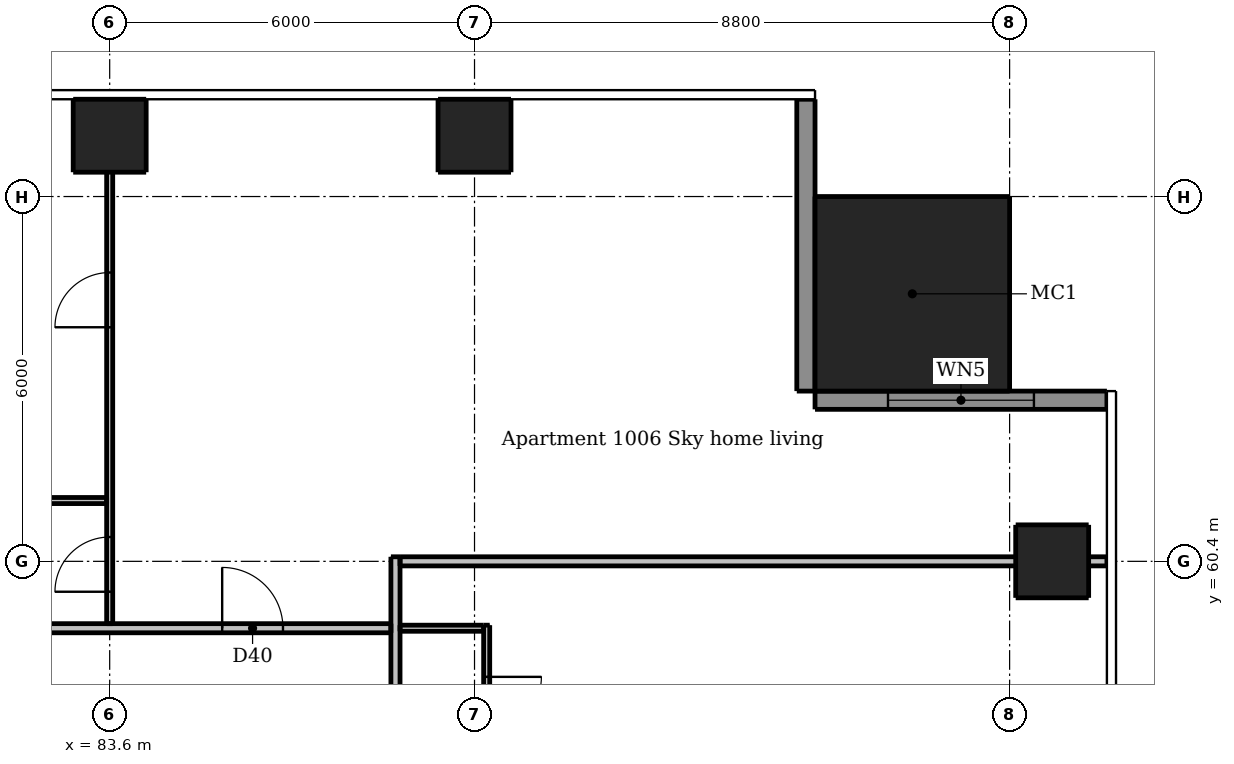
"""IFC4 building model, lengths in metres.
Left out: names, types, materials, properties, quantities, classifications, styles, units other than length and angle.
Written with IfcOpenShell. Run it as: python <this file> out.ifc"""

import sys

from ifc_helpers import new_model, si_unit, direction, frame, frame_2d, origin, origin_2d, place, context, subcontext, project, spatial, rectangle, extrude, element, fill, save


model = new_model("IFC4")
c1 = context("Model", 3, precision=1e-05, world=origin(), true_north=direction((0.0, 1.0)))
c2 = subcontext(c1, "Body", "Model", "MODEL_VIEW")
j1 = project(units=[si_unit("LENGTHUNIT", "METRE"), si_unit("PLANEANGLEUNIT", "RADIAN")], contexts=[c1])
p1 = place(None, origin())
s1 = spatial("IfcSite", under=j1, at=p1, CompositionType="ELEMENT")
p2 = place(p1, origin())
s2 = spatial("IfcBuilding", under=s1, at=p2, CompositionType="ELEMENT")
p3 = place(p2, frame((0.0, 0.0, 40.0)))
s3 = spatial("IfcBuildingStorey", under=s2, at=p3, CompositionType="ELEMENT", Elevation=40.0)
for number, where, z_axis, x_axis in (
    (1, (99.1, 60.4, 0.0), (0.0, 0.0, 1.0), (1.0, 0.0, 0.0)),
    (2, (83.6, 67.4, 0.0), (0.0, 0.0, 1.0), (1.0, 0.0, 0.0)),
    (3, (89.6, 67.4, 0.0), (0.0, 0.0, 1.0), (1.0, 0.0, 0.0)),
):
    element("IfcColumn", number, at=place(p3, frame(where, z_axis=z_axis, x_axis=x_axis)), inside=s3, PredefinedType="COLUMN", context=c2, shape_type="SweptSolid", body=[
        extrude(rectangle(XDim=1.2, YDim=1.2, at=origin_2d()), origin(), (0.0, 0.0, 1.0), 3.05),
    ])
p4 = place(p3, frame((96.8, 64.8, 0.0), z_axis=(0.0, 0.0, 1.0), x_axis=(1.0, 0.0, 0.0)))
e4 = element("IfcColumn", 4, at=p4, inside=s3, PredefinedType="COLUMN", context=c2, shape_type="SweptSolid", body=[
    extrude(rectangle(XDim=3.2, YDim=3.2, at=origin_2d()), origin(), (0.0, 0.0, 1.0), 3.3),
])
p5 = place(p3, frame((100.0, 63.05, 0.0), z_axis=(0.0, 0.0, 1.0), x_axis=(-1.0, 0.0, 0.0)))
e5 = element("IfcWall", 5, at=p5, inside=s3, PredefinedType="SOLIDWALL", context=c2, shape_type="SweptSolid", body=[
    extrude(rectangle(XDim=4.8, YDim=0.3, at=frame_2d((2.4, 0.0))), origin(), (0.0, 0.0, 1.0), 3.05),
])
p6 = place(p5, frame((1.2, 0.0, 0.15)))
e6 = element("IfcOpeningElement", 6, at=p6, cuts=e5, PredefinedType="OPENING", context=c2, shape_type="SweptSolid", body=[
    extrude(rectangle(XDim=2.4, YDim=2.1, at=frame_2d((1.2, 1.05))), frame((0.0, 0.16, 0.0), z_axis=(0.0, -1.0, 0.0), x_axis=(1.0, 0.0, 0.0)), (0.0, 0.0, 1.0), 0.32),
])
p7 = place(p3, frame((95.05, 63.2, 0.0), z_axis=(0.0, 0.0, 1.0), x_axis=(0.0, 1.0, 0.0)))
e7 = element("IfcWall", 7, at=p7, inside=s3, PredefinedType="SOLIDWALL", context=c2, shape_type="SweptSolid", body=[
    extrude(rectangle(XDim=4.8, YDim=0.3, at=frame_2d((2.4, 0.0))), origin(), (0.0, 0.0, 1.0), 3.05),
])
p8 = place(p3, frame((83.6, 59.375, 0.0), z_axis=(0.0, 0.0, 1.0), x_axis=(0.0, 1.0, 0.0)))
e8 = element("IfcWall", 8, at=p8, inside=s3, PredefinedType="PARTITIONING", context=c2, shape_type="SweptSolid", body=[
    extrude(rectangle(XDim=8.625, YDim=0.1, at=frame_2d((4.312, 0.0))), origin(), (0.0, 0.0, 1.0), 2.516),
])
p9 = place(p8, frame((0.525, 0.0, 0.0)))
e9 = element("IfcOpeningElement", 9, at=p9, cuts=e8, PredefinedType="OPENING", context=c2, shape_type="SweptSolid", body=[
    extrude(rectangle(XDim=0.9, YDim=2.1, at=frame_2d((0.45, 1.05))), frame((0.0, 0.06, 0.0), z_axis=(0.0, -1.0, 0.0), x_axis=(1.0, 0.0, 0.0)), (0.0, 0.0, 1.0), 0.12),
])
p10 = place(p8, frame((4.875, 0.0, 0.0)))
e10 = element("IfcOpeningElement", 10, at=p10, cuts=e8, PredefinedType="OPENING", context=c2, shape_type="SweptSolid", body=[
    extrude(rectangle(XDim=0.9, YDim=2.1, at=frame_2d((0.45, 1.05))), frame((0.0, 0.06, 0.0), z_axis=(0.0, -1.0, 0.0), x_axis=(1.0, 0.0, 0.0)), (0.0, 0.0, 1.0), 0.12),
])
p11 = place(p3, frame((89.8, 59.35, 0.0), z_axis=(0.0, 0.0, 1.0), x_axis=(0.0, -1.0, 0.0)))
e11 = element("IfcWall", 11, at=p11, inside=s3, PredefinedType="PARTITIONING", context=c2, shape_type="SweptSolid", body=[
    extrude(rectangle(XDim=19.875, YDim=0.1, at=frame_2d((9.938, 0.0))), origin(), (0.0, 0.0, 1.0), 3.05),
])
p12 = place(p11, frame((15.0, 0.0, 0.0)))
e12 = element("IfcOpeningElement", 12, at=p12, cuts=e11, PredefinedType="OPENING", context=c2, shape_type="SweptSolid", body=[
    extrude(rectangle(XDim=0.9, YDim=2.1, at=frame_2d((0.45, 1.05))), frame((0.0, 0.06, 0.0), z_axis=(0.0, -1.0, 0.0), x_axis=(1.0, 0.0, 0.0)), (0.0, 0.0, 1.0), 0.12),
])
p13 = place(p11, frame((9.0, 0.0, 0.0)))
e13 = element("IfcOpeningElement", 13, at=p13, cuts=e11, PredefinedType="OPENING", context=c2, shape_type="SweptSolid", body=[
    extrude(rectangle(XDim=0.9, YDim=2.1, at=frame_2d((0.45, 1.05))), frame((0.0, 0.06, 0.0), z_axis=(0.0, -1.0, 0.0), x_axis=(1.0, 0.0, 0.0)), (0.0, 0.0, 1.0), 0.12),
])
p14 = place(p11, frame((6.0, 0.0, 0.0)))
e14 = element("IfcOpeningElement", 14, at=p14, cuts=e11, PredefinedType="OPENING", context=c2, shape_type="SweptSolid", body=[
    extrude(rectangle(XDim=0.9, YDim=2.1, at=frame_2d((0.45, 1.05))), frame((0.0, 0.06, 0.0), z_axis=(0.0, -1.0, 0.0), x_axis=(1.0, 0.0, 0.0)), (0.0, 0.0, 1.0), 0.12),
])
p15 = place(p11, frame((0.85, 0.0, 0.0)))
e15 = element("IfcOpeningElement", 15, at=p15, cuts=e11, PredefinedType="OPENING", context=c2, shape_type="SweptSolid", body=[
    extrude(rectangle(XDim=0.9, YDim=2.1, at=frame_2d((0.45, 1.05))), frame((0.0, 0.06, 0.0), z_axis=(0.0, -1.0, 0.0), x_axis=(1.0, 0.0, 0.0)), (0.0, 0.0, 1.0), 0.12),
])
p16 = place(p11, frame((3.35, 0.0, 0.0)))
e16 = element("IfcOpeningElement", 16, at=p16, cuts=e11, PredefinedType="OPENING", context=c2, shape_type="SweptSolid", body=[
    extrude(rectangle(XDim=0.8, YDim=2.1, at=frame_2d((0.4, 1.05))), frame((0.0, 0.06, 0.0), z_axis=(0.0, -1.0, 0.0), x_axis=(1.0, 0.0, 0.0)), (0.0, 0.0, 1.0), 0.12),
])
p17 = place(p3, frame((83.55, 61.4, 0.0), z_axis=(0.0, 0.0, 1.0), x_axis=(-1.0, 0.0, 0.0)))
e17 = element("IfcWall", 17, at=p17, inside=s3, PredefinedType="PARTITIONING", context=c2, shape_type="SweptSolid", body=[
    extrude(rectangle(XDim=5.875, YDim=0.1, at=frame_2d((2.938, 0.0))), origin(), (0.0, 0.0, 1.0), 3.05),
])
p18 = place(p17, frame((3.75, 0.0, 0.0)))
e18 = element("IfcOpeningElement", 18, at=p18, cuts=e17, PredefinedType="OPENING", context=c2, shape_type="SweptSolid", body=[
    extrude(rectangle(XDim=0.8, YDim=2.1, at=frame_2d((0.4, 1.05))), frame((0.0, 0.06, 0.0), z_axis=(0.0, -1.0, 0.0), x_axis=(1.0, 0.0, 0.0)), (0.0, 0.0, 1.0), 0.12),
])
p19 = place(p3, frame((88.375, 59.3, 0.0), z_axis=(0.0, 0.0, 1.0), x_axis=(1.0, 0.0, 0.0)))
e19 = element("IfcWall", 19, at=p19, inside=s3, PredefinedType="PARTITIONING", context=c2, shape_type="SweptSolid", body=[
    extrude(rectangle(XDim=1.375, YDim=0.1, at=frame_2d((0.688, 0.0))), origin(), (0.0, 0.0, 1.0), 3.05),
])
p20 = place(p3, frame((88.3, 60.475, 0.0), z_axis=(0.0, 0.0, 1.0), x_axis=(0.0, -1.0, 0.0)))
e20 = element("IfcWall", 20, at=p20, inside=s3, PredefinedType="PARTITIONING", context=c2, shape_type="SweptSolid", body=[
    extrude(rectangle(XDim=28.7, YDim=0.15, at=frame_2d((14.35, 0.0))), origin(), (0.0, 0.0, 1.0), 3.05),
])
p21 = place(p20, frame((27.425, 0.0, 0.0)))
e21 = element("IfcOpeningElement", 21, at=p21, cuts=e20, PredefinedType="OPENING", context=c2, shape_type="SweptSolid", body=[
    extrude(rectangle(XDim=1.0, YDim=2.1, at=frame_2d((0.5, 1.05))), frame((0.0, 0.085, 0.0), z_axis=(0.0, -1.0, 0.0), x_axis=(1.0, 0.0, 0.0)), (0.0, 0.0, 1.0), 0.17),
])
p22 = place(p20, frame((10.625, 0.0, 0.0)))
e22 = element("IfcOpeningElement", 22, at=p22, cuts=e20, PredefinedType="OPENING", context=c2, shape_type="SweptSolid", body=[
    extrude(rectangle(XDim=1.0, YDim=2.1, at=frame_2d((0.5, 1.05))), frame((0.0, 0.085, 0.0), z_axis=(0.0, -1.0, 0.0), x_axis=(1.0, 0.0, 0.0)), (0.0, 0.0, 1.0), 0.17),
])
p23 = place(p3, frame((88.375, 60.4, 0.0), z_axis=(0.0, 0.0, 1.0), x_axis=(1.0, 0.0, 0.0)))
e23 = element("IfcWall", 23, at=p23, inside=s3, PredefinedType="PARTITIONING", context=c2, shape_type="SweptSolid", body=[
    extrude(rectangle(XDim=11.625, YDim=0.15, at=frame_2d((5.812, 0.0))), origin(), (0.0, 0.0, 1.0), 2.516),
])
p24 = place(p3, frame((59.675, 59.3, 0.0), z_axis=(0.0, 0.0, 1.0), x_axis=(1.0, 0.0, 0.0)))
e24 = element("IfcWall", 24, at=p24, inside=s3, PredefinedType="PARTITIONING", context=c2, shape_type="SweptSolid", body=[
    extrude(rectangle(XDim=28.55, YDim=0.15, at=frame_2d((14.275, 0.0))), origin(), (0.0, 0.0, 1.0), 3.05),
])
p25 = place(p24, frame((8.975, 0.0, 0.0)))
e25 = element("IfcOpeningElement", 25, at=p25, cuts=e24, PredefinedType="OPENING", context=c2, shape_type="SweptSolid", body=[
    extrude(rectangle(XDim=1.0, YDim=2.1, at=frame_2d((0.5, 1.05))), frame((0.0, 0.085, 0.0), z_axis=(0.0, -1.0, 0.0), x_axis=(1.0, 0.0, 0.0)), (0.0, 0.0, 1.0), 0.17),
])
p26 = place(p24, frame((25.775, 0.0, 0.0)))
e26 = element("IfcOpeningElement", 26, at=p26, cuts=e24, PredefinedType="OPENING", context=c2, shape_type="SweptSolid", body=[
    extrude(rectangle(XDim=1.0, YDim=2.1, at=frame_2d((0.5, 1.05))), frame((0.0, 0.085, 0.0), z_axis=(0.0, -1.0, 0.0), x_axis=(1.0, 0.0, 0.0)), (0.0, 0.0, 1.0), 0.17),
])
p27 = place(p6, origin())
e27 = element("IfcWindow", 27, at=p27, inside=s3, PartitioningType="DOUBLE_PANEL_VERTICAL", PredefinedType="WINDOW", context=c2, shape_type="SweptSolid", body=[
    extrude(rectangle(XDim=2.4, YDim=2.1, at=frame_2d((1.2, 1.05))), frame((0.0, 0.03, 0.0), z_axis=(0.0, -1.0, 0.0), x_axis=(1.0, 0.0, 0.0)), (0.0, 0.0, 1.0), 0.06),
])
fill(e6, e27)
p28 = place(p15, origin())
e28 = element("IfcDoor", 28, at=p28, inside=s3, OperationType="SINGLE_SWING_LEFT", PredefinedType="DOOR", context=c2, shape_type="SweptSolid", body=[
    extrude(rectangle(XDim=0.9, YDim=2.1, at=frame_2d((0.45, 1.05))), frame((0.0, 0.025, 0.0), z_axis=(0.0, -1.0, 0.0), x_axis=(1.0, 0.0, 0.0)), (0.0, 0.0, 1.0), 0.05),
])
fill(e15, e28)
p29 = place(p26, origin())
e29 = element("IfcDoor", 29, at=p29, inside=s3, OperationType="SINGLE_SWING_LEFT", PredefinedType="DOOR", context=c2, shape_type="SweptSolid", body=[
    extrude(rectangle(XDim=1.0, YDim=2.1, at=frame_2d((0.5, 1.05))), frame((0.0, 0.025, 0.0), z_axis=(0.0, -1.0, 0.0), x_axis=(1.0, 0.0, 0.0)), (0.0, 0.0, 1.0), 0.05),
])
fill(e26, e29)
p30 = place(p9, origin())
e30 = element("IfcDoor", 30, at=p30, inside=s3, OperationType="SINGLE_SWING_LEFT", PredefinedType="DOOR", context=c2, shape_type="SweptSolid", body=[
    extrude(rectangle(XDim=0.9, YDim=2.1, at=frame_2d((0.45, 1.05))), frame((0.0, 0.025, 0.0), z_axis=(0.0, -1.0, 0.0), x_axis=(1.0, 0.0, 0.0)), (0.0, 0.0, 1.0), 0.05),
])
fill(e9, e30)
p31 = place(p10, origin())
e31 = element("IfcDoor", 31, at=p31, inside=s3, OperationType="SINGLE_SWING_LEFT", PredefinedType="DOOR", context=c2, shape_type="SweptSolid", body=[
    extrude(rectangle(XDim=0.9, YDim=2.1, at=frame_2d((0.45, 1.05))), frame((0.0, 0.025, 0.0), z_axis=(0.0, -1.0, 0.0), x_axis=(1.0, 0.0, 0.0)), (0.0, 0.0, 1.0), 0.05),
])
fill(e10, e31)
save(model, sys.argv[1])
